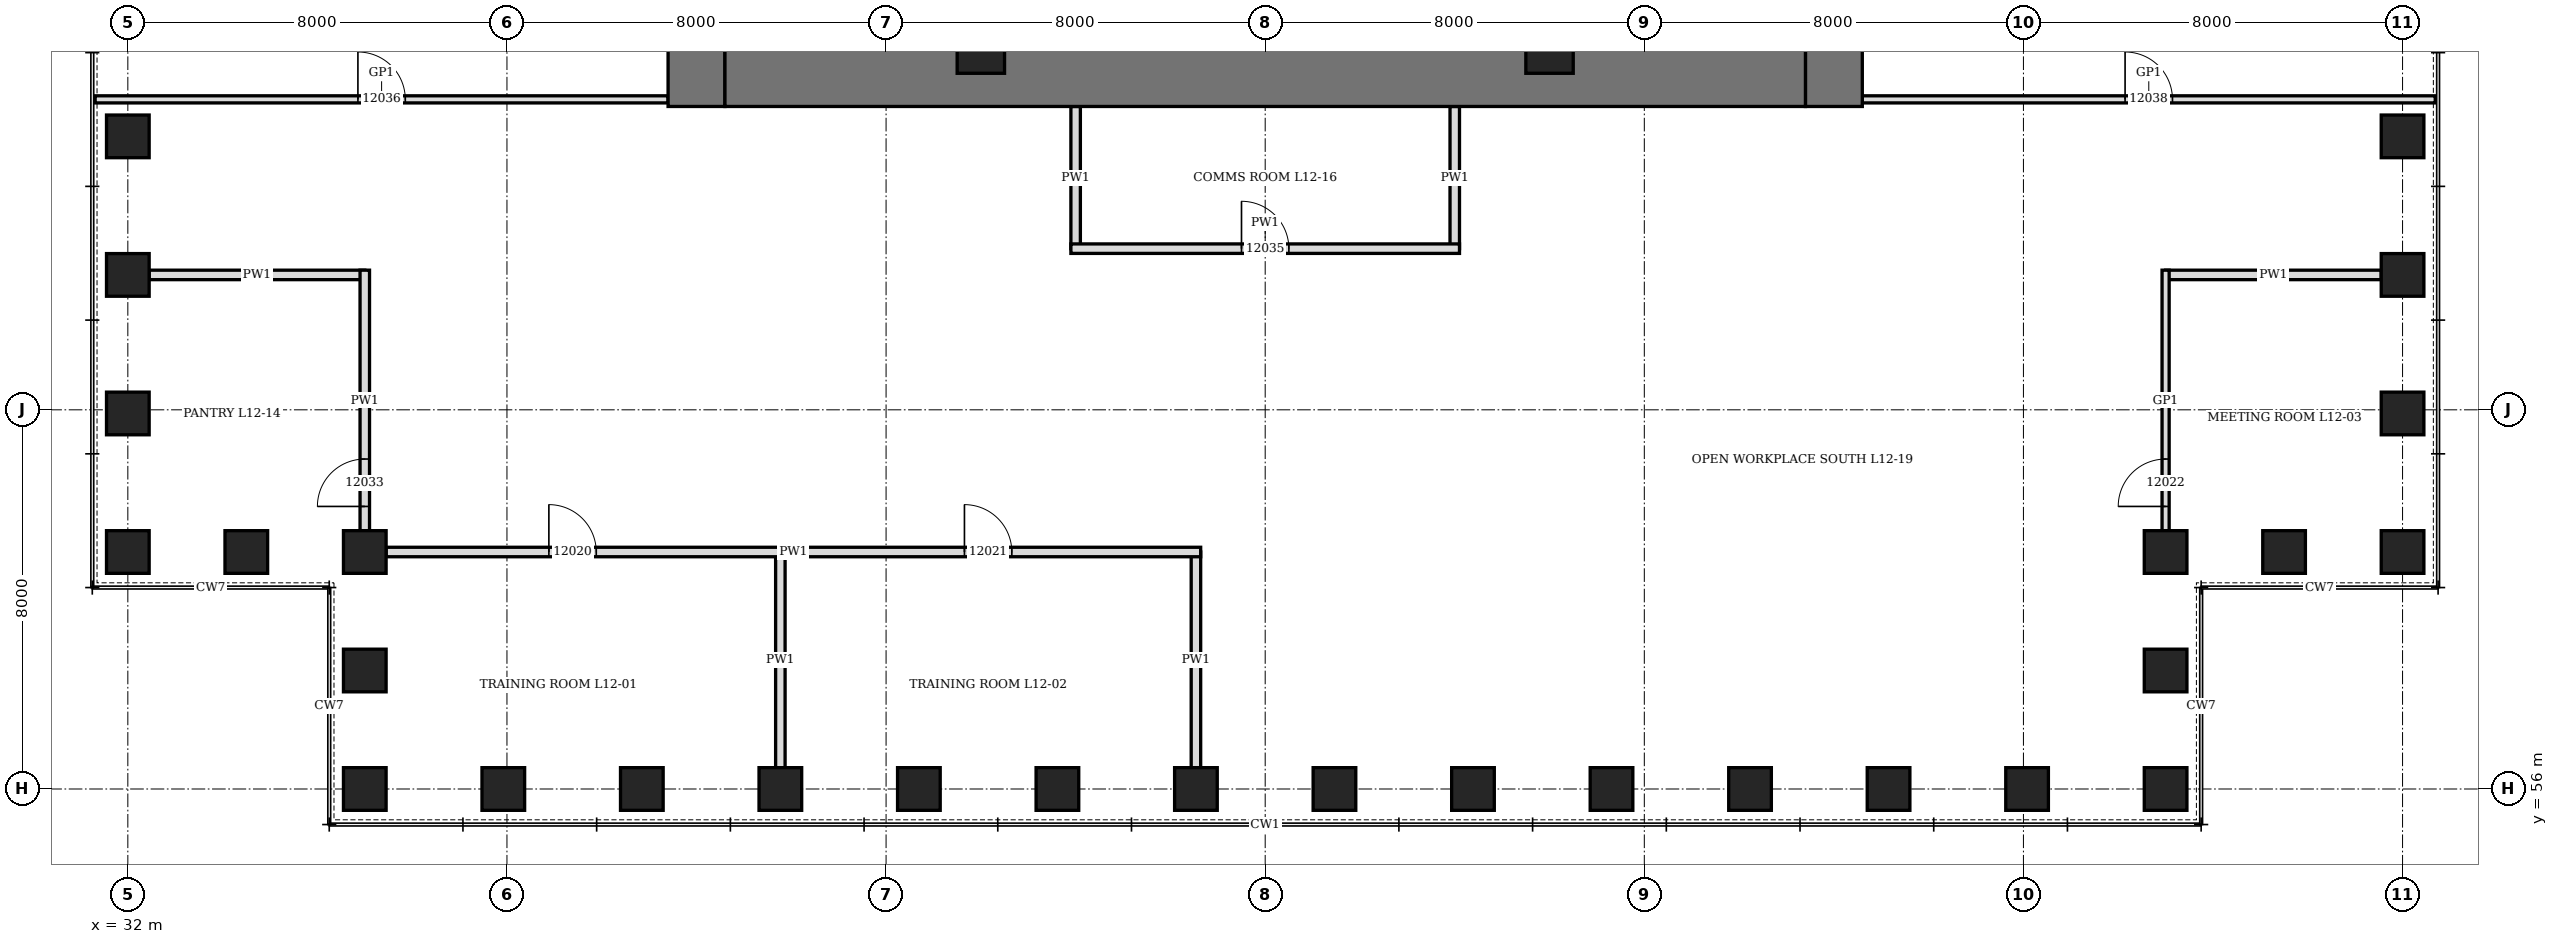
"""IFC4 building model, lengths in metres.
Left out: names, types, materials, properties, quantities, classifications, styles, units other than length and angle.
Written with IfcOpenShell. Run it as: python <this file> out.ifc"""

import sys

from ifc_helpers import new_model, si_unit, direction, frame, frame_2d, origin, origin_2d, place, context, subcontext, project, spatial, rectangle, hollow_rectangle, extrude, element, fill, save


model = new_model("IFC4")
c1 = context("Model", 3, precision=1e-05, world=origin(), true_north=direction((0.0, 1.0)))
c2 = subcontext(c1, "Body", "Model", "MODEL_VIEW")
j1 = project(units=[si_unit("LENGTHUNIT", "METRE"), si_unit("PLANEANGLEUNIT", "RADIAN")], contexts=[c1])
p1 = place(None, origin())
s1 = spatial("IfcSite", under=j1, at=p1, CompositionType="ELEMENT")
p2 = place(p1, origin())
s2 = spatial("IfcBuilding", under=s1, at=p2, CompositionType="ELEMENT")
p3 = place(p2, frame((0.0, 0.0, 60.1)))
s3 = spatial("IfcBuildingStorey", under=s2, at=p3, CompositionType="ELEMENT", Elevation=60.1)
for number, where, z_axis, x_axis in (
    (1, (37.0, 56.0, 0.0), (0.0, 0.0, 1.0), (1.0, 0.0, 0.0)),
    (2, (39.923, 56.0, 0.0), (0.0, 0.0, 1.0), (1.0, 0.0, 0.0)),
    (3, (42.846, 56.0, 0.0), (0.0, 0.0, 1.0), (1.0, 0.0, 0.0)),
    (4, (45.769, 56.0, 0.0), (0.0, 0.0, 1.0), (1.0, 0.0, 0.0)),
    (5, (48.692, 56.0, 0.0), (0.0, 0.0, 1.0), (1.0, 0.0, 0.0)),
    (6, (51.615, 56.0, 0.0), (0.0, 0.0, 1.0), (1.0, 0.0, 0.0)),
    (7, (54.539, 56.0, 0.0), (0.0, 0.0, 1.0), (1.0, 0.0, 0.0)),
    (8, (57.461, 56.0, 0.0), (0.0, 0.0, 1.0), (1.0, 0.0, 0.0)),
    (9, (60.385, 56.0, 0.0), (0.0, 0.0, 1.0), (1.0, 0.0, 0.0)),
    (10, (63.308, 56.0, 0.0), (0.0, 0.0, 1.0), (1.0, 0.0, 0.0)),
    (11, (66.231, 56.0, 0.0), (0.0, 0.0, 1.0), (1.0, 0.0, 0.0)),
    (12, (69.154, 56.0, 0.0), (0.0, 0.0, 1.0), (1.0, 0.0, 0.0)),
    (13, (72.077, 56.0, 0.0), (0.0, 0.0, 1.0), (1.0, 0.0, 0.0)),
    (14, (75.0, 56.0, 0.0), (0.0, 0.0, 1.0), (0.0, 1.0, 0.0)),
    (15, (75.0, 58.5, 0.0), (0.0, 0.0, 1.0), (0.0, 1.0, 0.0)),
    (16, (75.0, 61.0, 0.0), (0.0, 0.0, 1.0), (1.0, 0.0, 0.0)),
    (17, (77.5, 61.0, 0.0), (0.0, 0.0, 1.0), (1.0, 0.0, 0.0)),
    (18, (80.0, 61.0, 0.0), (0.0, 0.0, 1.0), (0.0, 1.0, 0.0)),
    (19, (80.0, 63.923, 0.0), (0.0, 0.0, 1.0), (0.0, 1.0, 0.0)),
    (20, (80.0, 66.846, 0.0), (0.0, 0.0, 1.0), (0.0, 1.0, 0.0)),
    (21, (80.0, 69.769, 0.0), (0.0, 0.0, 1.0), (0.0, 1.0, 0.0)),
    (22, (32.0, 69.769, 0.0), (0.0, 0.0, 1.0), (0.0, 1.0, 0.0)),
    (23, (32.0, 66.846, 0.0), (0.0, 0.0, 1.0), (0.0, 1.0, 0.0)),
    (24, (32.0, 63.923, 0.0), (0.0, 0.0, 1.0), (0.0, 1.0, 0.0)),
    (25, (32.0, 61.0, 0.0), (0.0, 0.0, 1.0), (1.0, 0.0, 0.0)),
    (26, (34.5, 61.0, 0.0), (0.0, 0.0, 1.0), (1.0, 0.0, 0.0)),
    (27, (37.0, 61.0, 0.0), (0.0, 0.0, 1.0), (0.0, 1.0, 0.0)),
    (28, (37.0, 58.5, 0.0), (0.0, 0.0, 1.0), (0.0, 1.0, 0.0)),
):
    element("IfcColumn", number, at=place(p3, frame(where, z_axis=z_axis, x_axis=x_axis)), inside=s3, PredefinedType="COLUMN", context=c2, shape_type="SweptSolid", body=[
        extrude(hollow_rectangle(XDim=0.9, YDim=0.9, WallThickness=0.12, at=origin_2d()), origin(), (0.0, 0.0, 1.0), 4.2),
    ])
p4 = place(p3, frame((44.0, 70.4, 0.0), z_axis=(0.0, 0.0, 1.0), x_axis=(0.0, 1.0, 0.0)))
e29 = element("IfcWall", 29, at=p4, inside=s3, PredefinedType="SHEAR", context=c2, shape_type="SweptSolid", body=[
    extrude(rectangle(XDim=19.2, YDim=1.2, at=frame_2d((9.6, 0.0))), origin(), (0.0, 0.0, 1.0), 4.2),
])
p5 = place(p4, frame((8.6, 0.0, 0.0)))
e30 = element("IfcOpeningElement", 30, at=p5, cuts=e29, PredefinedType="OPENING", context=c2, shape_type="SweptSolid", body=[
    extrude(rectangle(XDim=2.0, YDim=2.4, at=frame_2d((1.0, 1.2))), frame((0.0, 0.61, 0.0), z_axis=(0.0, -1.0, 0.0), x_axis=(1.0, 0.0, 0.0)), (0.0, 0.0, 1.0), 1.22),
])
p6 = place(p3, frame((68.0, 70.4, 0.0), z_axis=(0.0, 0.0, 1.0), x_axis=(0.0, 1.0, 0.0)))
e31 = element("IfcWall", 31, at=p6, inside=s3, PredefinedType="SHEAR", context=c2, shape_type="SweptSolid", body=[
    extrude(rectangle(XDim=19.2, YDim=1.2, at=frame_2d((9.6, 0.0))), origin(), (0.0, 0.0, 1.0), 4.2),
])
p7 = place(p6, frame((8.6, 0.0, 0.0)))
e32 = element("IfcOpeningElement", 32, at=p7, cuts=e31, PredefinedType="OPENING", context=c2, shape_type="SweptSolid", body=[
    extrude(rectangle(XDim=2.0, YDim=2.4, at=frame_2d((1.0, 1.2))), frame((0.0, 0.61, 0.0), z_axis=(0.0, -1.0, 0.0), x_axis=(1.0, 0.0, 0.0)), (0.0, 0.0, 1.0), 1.22),
])
p8 = place(p3, frame((44.6, 71.0, 0.0), z_axis=(0.0, 0.0, 1.0), x_axis=(1.0, 0.0, 0.0)))
e33 = element("IfcWall", 33, at=p8, inside=s3, PredefinedType="SHEAR", context=c2, shape_type="SweptSolid", body=[
    extrude(rectangle(XDim=22.8, YDim=1.2, at=frame_2d((11.4, 0.0))), origin(), (0.0, 0.0, 1.0), 4.2),
])
for number, where, z_axis, x_axis in (
    (34, (50.0, 71.6, 0.0), (0.0, 0.0, 1.0), (1.0, 0.0, 0.0)),
    (35, (62.0, 71.6, 0.0), (0.0, 0.0, 1.0), (1.0, 0.0, 0.0)),
):
    element("IfcColumn", number, at=place(p3, frame(where, z_axis=z_axis, x_axis=x_axis)), inside=s3, PredefinedType="COLUMN", context=c2, shape_type="SweptSolid", body=[
        extrude(hollow_rectangle(XDim=1.0, YDim=1.0, WallThickness=0.15, at=origin_2d()), origin(), (0.0, 0.0, 1.0), 4.2),
    ])
for number, where, z_axis, x_axis in (
    (36, (45.769, 56.45, 0.0), (0.0, 0.0, 1.0), (0.0, 1.0, 0.0)),
    (37, (54.539, 56.45, 0.0), (0.0, 0.0, 1.0), (0.0, 1.0, 0.0)),
):
    element("IfcWall", number, at=place(p3, frame(where, z_axis=z_axis, x_axis=x_axis)), inside=s3, PredefinedType="PARTITIONING", context=c2, shape_type="SweptSolid", body=[
        extrude(rectangle(XDim=4.55, YDim=0.2, at=frame_2d((2.275, 0.0))), origin(), (0.0, 0.0, 1.0), 3.278),
    ])
for number, where, z_axis, x_axis in (
    (38, (75.0, 66.846, 0.0), (0.0, 0.0, 1.0), (1.0, 0.0, 0.0)),
    (39, (32.45, 66.846, 0.0), (0.0, 0.0, 1.0), (1.0, 0.0, 0.0)),
):
    element("IfcWall", number, at=place(p3, frame(where, z_axis=z_axis, x_axis=x_axis)), inside=s3, PredefinedType="PARTITIONING", context=c2, shape_type="SweptSolid", body=[
        extrude(rectangle(XDim=4.55, YDim=0.2, at=frame_2d((2.275, 0.0))), origin(), (0.0, 0.0, 1.0), 3.428),
    ])
for number, where, z_axis, x_axis in (
    (40, (52.0, 67.4, 0.0), (0.0, 0.0, 1.0), (0.0, 1.0, 0.0)),
    (41, (60.0, 67.4, 0.0), (0.0, 0.0, 1.0), (0.0, 1.0, 0.0)),
):
    element("IfcWall", number, at=place(p3, frame(where, z_axis=z_axis, x_axis=x_axis)), inside=s3, PredefinedType="PARTITIONING", context=c2, shape_type="SweptSolid", body=[
        extrude(rectangle(XDim=3.0, YDim=0.2, at=frame_2d((1.5, 0.0))), origin(), (0.0, 0.0, 1.0), 4.04),
    ])
p9 = place(p3, frame((37.45, 61.0, 0.0), z_axis=(0.0, 0.0, 1.0), x_axis=(1.0, 0.0, 0.0)))
e42 = element("IfcWall", 42, at=p9, inside=s3, PredefinedType="PARTITIONING", context=c2, shape_type="SweptSolid", body=[
    extrude(rectangle(XDim=17.188, YDim=0.2, at=frame_2d((8.594, 0.0))), origin(), (0.0, 0.0, 1.0), 4.04),
])
p10 = place(p9, frame((3.435, 0.0, 0.0)))
e43 = element("IfcOpeningElement", 43, at=p10, cuts=e42, PredefinedType="OPENING", context=c2, shape_type="SweptSolid", body=[
    extrude(rectangle(XDim=1.0, YDim=2.1, at=frame_2d((0.5, 1.05))), frame((0.0, 0.11, 0.0), z_axis=(0.0, -1.0, 0.0), x_axis=(1.0, 0.0, 0.0)), (0.0, 0.0, 1.0), 0.22),
])
p11 = place(p9, frame((12.204, 0.0, 0.0)))
e44 = element("IfcOpeningElement", 44, at=p11, cuts=e42, PredefinedType="OPENING", context=c2, shape_type="SweptSolid", body=[
    extrude(rectangle(XDim=1.0, YDim=2.1, at=frame_2d((0.5, 1.05))), frame((0.0, 0.11, 0.0), z_axis=(0.0, -1.0, 0.0), x_axis=(1.0, 0.0, 0.0)), (0.0, 0.0, 1.0), 0.22),
])
p12 = place(p3, frame((51.9, 67.4, 0.0), z_axis=(0.0, 0.0, 1.0), x_axis=(1.0, 0.0, 0.0)))
e45 = element("IfcWall", 45, at=p12, inside=s3, PredefinedType="PARTITIONING", context=c2, shape_type="SweptSolid", body=[
    extrude(rectangle(XDim=8.2, YDim=0.2, at=frame_2d((4.1, 0.0))), origin(), (0.0, 0.0, 1.0), 4.04),
])
p13 = place(p12, frame((3.6, 0.0, 0.0)))
e46 = element("IfcOpeningElement", 46, at=p13, cuts=e45, PredefinedType="OPENING", context=c2, shape_type="SweptSolid", body=[
    extrude(rectangle(XDim=1.0, YDim=2.1, at=frame_2d((0.5, 1.05))), frame((0.0, 0.11, 0.0), z_axis=(0.0, -1.0, 0.0), x_axis=(1.0, 0.0, 0.0)), (0.0, 0.0, 1.0), 0.22),
])
p14 = place(p3, frame((31.31, 70.55, 0.0), z_axis=(0.0, 0.0, 1.0), x_axis=(1.0, 0.0, 0.0)))
e47 = element("IfcWall", 47, at=p14, inside=s3, PredefinedType="PARTITIONING", context=c2, shape_type="SweptSolid", body=[
    extrude(rectangle(XDim=12.09, YDim=0.15, at=frame_2d((6.045, 0.0))), origin(), (0.0, 0.0, 1.0), 4.04),
])
p15 = place(p14, frame((5.545, 0.0, 0.0)))
e48 = element("IfcOpeningElement", 48, at=p15, cuts=e47, PredefinedType="OPENING", context=c2, shape_type="SweptSolid", body=[
    extrude(rectangle(XDim=1.0, YDim=2.4, at=frame_2d((0.5, 1.2))), frame((0.0, 0.085, 0.0), z_axis=(0.0, -1.0, 0.0), x_axis=(1.0, 0.0, 0.0)), (0.0, 0.0, 1.0), 0.17),
])
p16 = place(p3, frame((68.6, 70.55, 0.0), z_axis=(0.0, 0.0, 1.0), x_axis=(1.0, 0.0, 0.0)))
e49 = element("IfcWall", 49, at=p16, inside=s3, PredefinedType="PARTITIONING", context=c2, shape_type="SweptSolid", body=[
    extrude(rectangle(XDim=12.09, YDim=0.15, at=frame_2d((6.045, 0.0))), origin(), (0.0, 0.0, 1.0), 4.04),
])
p17 = place(p16, frame((5.545, 0.0, 0.0)))
e50 = element("IfcOpeningElement", 50, at=p17, cuts=e49, PredefinedType="OPENING", context=c2, shape_type="SweptSolid", body=[
    extrude(rectangle(XDim=1.0, YDim=2.4, at=frame_2d((0.5, 1.2))), frame((0.0, 0.085, 0.0), z_axis=(0.0, -1.0, 0.0), x_axis=(1.0, 0.0, 0.0)), (0.0, 0.0, 1.0), 0.17),
])
p18 = place(p3, frame((37.0, 61.45, 0.0), z_axis=(0.0, 0.0, 1.0), x_axis=(0.0, 1.0, 0.0)))
e51 = element("IfcWall", 51, at=p18, inside=s3, PredefinedType="PARTITIONING", context=c2, shape_type="SweptSolid", body=[
    extrude(rectangle(XDim=5.496, YDim=0.2, at=frame_2d((2.748, 0.0))), origin(), (0.0, 0.0, 1.0), 4.04),
])
p19 = place(p18, frame((0.511, 0.0, 0.0)))
e52 = element("IfcOpeningElement", 52, at=p19, cuts=e51, PredefinedType="OPENING", context=c2, shape_type="SweptSolid", body=[
    extrude(rectangle(XDim=1.0, YDim=2.1, at=frame_2d((0.5, 1.05))), frame((0.0, 0.11, 0.0), z_axis=(0.0, -1.0, 0.0), x_axis=(1.0, 0.0, 0.0)), (0.0, 0.0, 1.0), 0.22),
])
p20 = place(p3, frame((75.0, 61.45, 0.0), z_axis=(0.0, 0.0, 1.0), x_axis=(0.0, 1.0, 0.0)))
e53 = element("IfcWall", 53, at=p20, inside=s3, PredefinedType="PARTITIONING", context=c2, shape_type="SweptSolid", body=[
    extrude(rectangle(XDim=5.496, YDim=0.15, at=frame_2d((2.748, 0.0))), origin(), (0.0, 0.0, 1.0), 4.04),
])
p21 = place(p20, frame((0.511, 0.0, 0.0)))
e54 = element("IfcOpeningElement", 54, at=p21, cuts=e53, PredefinedType="OPENING", context=c2, shape_type="SweptSolid", body=[
    extrude(rectangle(XDim=1.0, YDim=2.4, at=frame_2d((0.5, 1.2))), frame((0.0, 0.085, 0.0), z_axis=(0.0, -1.0, 0.0), x_axis=(1.0, 0.0, 0.0)), (0.0, 0.0, 1.0), 0.17),
])
p22 = place(p10, origin())
e55 = element("IfcDoor", 55, at=p22, inside=s3, OperationType="SINGLE_SWING_LEFT", PredefinedType="DOOR", context=c2, shape_type="SweptSolid", body=[
    extrude(rectangle(XDim=1.0, YDim=2.1, at=frame_2d((0.5, 1.05))), frame((0.0, 0.1, 0.0), z_axis=(0.0, -1.0, 0.0), x_axis=(1.0, 0.0, 0.0)), (0.0, 0.0, 1.0), 0.199),
])
fill(e43, e55)
p23 = place(p11, origin())
e56 = element("IfcDoor", 56, at=p23, inside=s3, OperationType="SINGLE_SWING_LEFT", PredefinedType="DOOR", context=c2, shape_type="SweptSolid", body=[
    extrude(rectangle(XDim=1.0, YDim=2.1, at=frame_2d((0.5, 1.05))), frame((0.0, 0.1, 0.0), z_axis=(0.0, -1.0, 0.0), x_axis=(1.0, 0.0, 0.0)), (0.0, 0.0, 1.0), 0.199),
])
fill(e44, e56)
p24 = place(p21, origin())
e57 = element("IfcDoor", 57, at=p24, inside=s3, OperationType="SINGLE_SWING_RIGHT", PredefinedType="DOOR", context=c2, shape_type="SweptSolid", body=[
    extrude(rectangle(XDim=1.0, YDim=2.4, at=frame_2d((0.5, 1.2))), frame((0.0, 0.075, 0.0), z_axis=(0.0, -1.0, 0.0), x_axis=(1.0, 0.0, 0.0)), (0.0, 0.0, 1.0), 0.149),
])
fill(e54, e57)
p25 = place(p19, origin())
e58 = element("IfcDoor", 58, at=p25, inside=s3, OperationType="SINGLE_SWING_LEFT", PredefinedType="DOOR", context=c2, shape_type="SweptSolid", body=[
    extrude(rectangle(XDim=1.0, YDim=2.1, at=frame_2d((0.5, 1.05))), frame((0.0, 0.1, 0.0), z_axis=(0.0, -1.0, 0.0), x_axis=(1.0, 0.0, 0.0)), (0.0, 0.0, 1.0), 0.199),
])
fill(e52, e58)
p26 = place(p13, origin())
e59 = element("IfcDoor", 59, at=p26, inside=s3, OperationType="SINGLE_SWING_LEFT", PredefinedType="DOOR", context=c2, shape_type="SweptSolid", body=[
    extrude(rectangle(XDim=1.0, YDim=2.1, at=frame_2d((0.5, 1.05))), frame((0.0, 0.1, 0.0), z_axis=(0.0, -1.0, 0.0), x_axis=(1.0, 0.0, 0.0)), (0.0, 0.0, 1.0), 0.199),
])
fill(e46, e59)
p27 = place(p15, origin())
e60 = element("IfcDoor", 60, at=p27, inside=s3, OperationType="SINGLE_SWING_RIGHT", PredefinedType="DOOR", context=c2, shape_type="SweptSolid", body=[
    extrude(rectangle(XDim=1.0, YDim=2.4, at=frame_2d((0.5, 1.2))), frame((0.0, 0.075, 0.0), z_axis=(0.0, -1.0, 0.0), x_axis=(1.0, 0.0, 0.0)), (0.0, 0.0, 1.0), 0.149),
])
fill(e48, e60)
p28 = place(p17, origin())
e61 = element("IfcDoor", 61, at=p28, inside=s3, OperationType="SINGLE_SWING_RIGHT", PredefinedType="DOOR", context=c2, shape_type="SweptSolid", body=[
    extrude(rectangle(XDim=1.0, YDim=2.4, at=frame_2d((0.5, 1.2))), frame((0.0, 0.075, 0.0), z_axis=(0.0, -1.0, 0.0), x_axis=(1.0, 0.0, 0.0)), (0.0, 0.0, 1.0), 0.149),
])
fill(e50, e61)
save(model, sys.argv[1])
